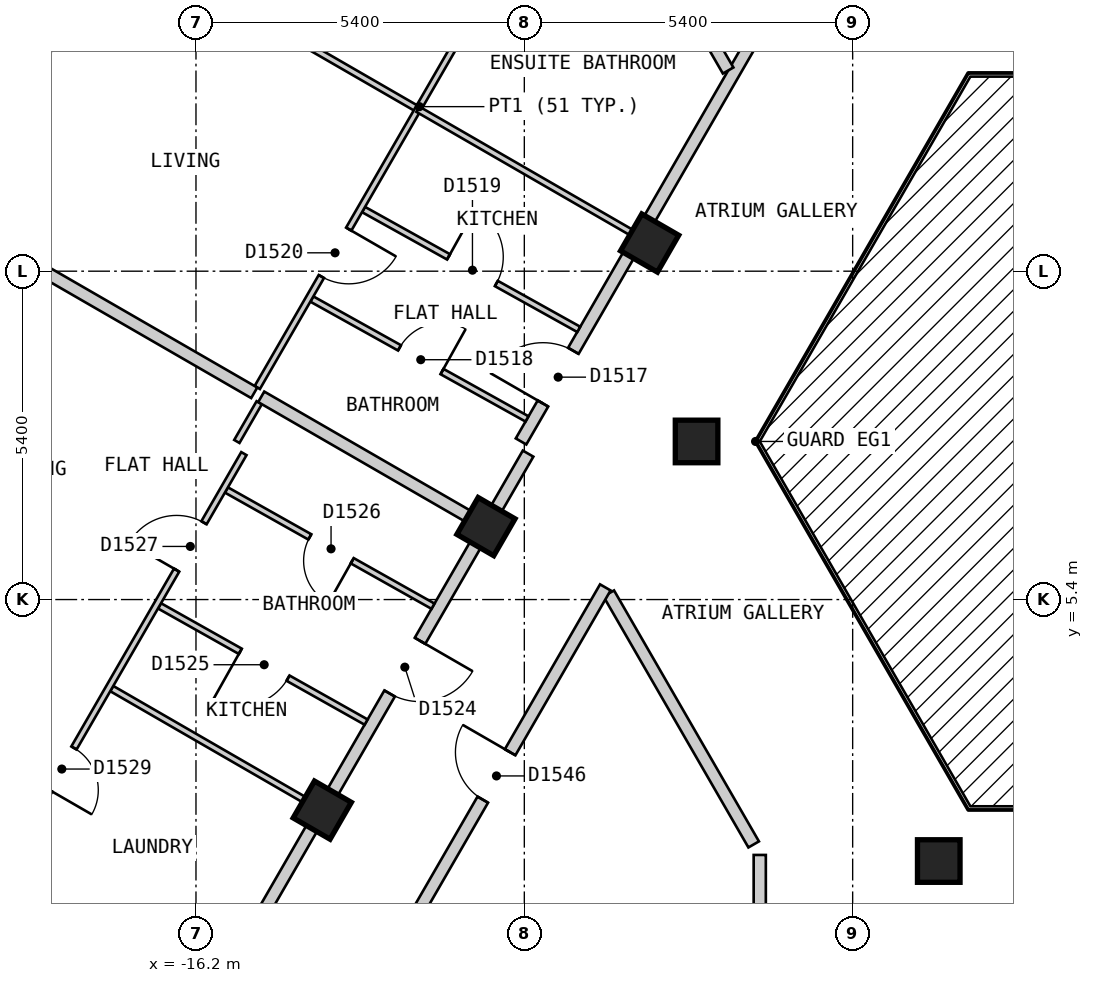
"""IFC4 building model, lengths in metres.
Left out: names, types, materials, properties, quantities, classifications, styles, units other than length and angle.
Written with IfcOpenShell. Run it as: python <this file> out.ifc"""

import sys

from ifc_helpers import new_model, si_unit, direction, frame, frame_2d, origin, origin_2d, place, context, subcontext, project, spatial, polyline, rectangle, outline, extrude, element, fill, save


model = new_model("IFC4")
c1 = context("Model", 3, precision=1e-05, world=origin(), true_north=direction((0.0, 1.0)))
c2 = subcontext(c1, "Body", "Model", "MODEL_VIEW")
j1 = project(units=[si_unit("LENGTHUNIT", "METRE"), si_unit("PLANEANGLEUNIT", "RADIAN")], contexts=[c1])
p1 = place(None, origin())
s1 = spatial("IfcSite", under=j1, at=p1, CompositionType="ELEMENT")
p2 = place(p1, origin())
s2 = spatial("IfcBuilding", under=s1, at=p2, CompositionType="ELEMENT")
p3 = place(p2, frame((0.0, 0.0, 196.2)))
s3 = spatial("IfcBuildingStorey", under=s2, at=p3, CompositionType="ELEMENT", Elevation=196.2)
for number, where, z_axis, x_axis in (
    (1, (-8.739, 11.263, 0.0), (0.0, 0.0, 1.0), (-0.5, -0.866, 0.0)),
    (2, (-7.967, 8.0, 0.0), (0.0, 0.0, 1.0), (1.0, 0.0, 0.0)),
    (3, (-11.431, 6.6, 0.0), (0.0, 0.0, 1.0), (-0.5, -0.866, 0.0)),
    (4, (-3.984, 1.1, 0.0), (0.0, 0.0, 1.0), (1.0, 0.0, 0.0)),
    (5, (-14.123, 1.937, 0.0), (0.0, 0.0, 1.0), (-0.5, -0.866, 0.0)),
):
    element("IfcColumn", number, at=place(p3, frame(where, z_axis=z_axis, x_axis=x_axis)), inside=s3, PredefinedType="COLUMN", context=c2, shape_type="SweptSolid", body=[
        extrude(rectangle(XDim=0.7, YDim=0.7, at=origin_2d()), origin(), (0.0, 0.0, 1.0), 3.0),
    ])
p4 = place(p3, frame((-14.592, 21.625, 0.0), z_axis=(0.0, 0.0, 1.0), x_axis=(-0.500010537973, -0.866019319597, 0.0)))
e6 = element("IfcWall", 6, at=p4, inside=s3, PredefinedType="SOLIDWALL", context=c2, shape_type="SweptSolid", body=[
    extrude(outline(polyline([(0.0, -0.15), (22.863, -0.15), (22.783, 0.15), (0.08, 0.15), (0.0, -0.15)])), origin(), (0.0, 0.0, 1.0), 2.6),
])
p5 = place(p4, frame((1.259, 0.0, 0.15)))
e7 = element("IfcOpeningElement", 7, at=p5, cuts=e6, PredefinedType="OPENING", context=c2, shape_type="SweptSolid", body=[
    extrude(rectangle(XDim=1.5, YDim=2.1, at=frame_2d((0.75, 1.05))), frame((0.0, 0.16, 0.0), z_axis=(0.0, -1.0, 0.0), x_axis=(1.0, 0.0, 0.0)), (0.0, 0.0, 1.0), 0.32),
])
p6 = place(p4, frame((3.952, 0.0, 0.15)))
e8 = element("IfcOpeningElement", 8, at=p6, cuts=e6, PredefinedType="OPENING", context=c2, shape_type="SweptSolid", body=[
    extrude(rectangle(XDim=1.5, YDim=2.1, at=frame_2d((0.75, 1.05))), frame((0.0, 0.16, 0.0), z_axis=(0.0, -1.0, 0.0), x_axis=(1.0, 0.0, 0.0)), (0.0, 0.0, 1.0), 0.32),
])
p7 = place(p4, frame((6.644, 0.0, 0.15)))
e9 = element("IfcOpeningElement", 9, at=p7, cuts=e6, PredefinedType="OPENING", context=c2, shape_type="SweptSolid", body=[
    extrude(rectangle(XDim=1.5, YDim=2.1, at=frame_2d((0.75, 1.05))), frame((0.0, 0.16, 0.0), z_axis=(0.0, -1.0, 0.0), x_axis=(1.0, 0.0, 0.0)), (0.0, 0.0, 1.0), 0.32),
])
p8 = place(p4, frame((9.335, 0.0, 0.15)))
e10 = element("IfcOpeningElement", 10, at=p8, cuts=e6, PredefinedType="OPENING", context=c2, shape_type="SweptSolid", body=[
    extrude(rectangle(XDim=1.5, YDim=2.1, at=frame_2d((0.75, 1.05))), frame((0.0, 0.16, 0.0), z_axis=(0.0, -1.0, 0.0), x_axis=(1.0, 0.0, 0.0)), (0.0, 0.0, 1.0), 0.32),
])
p9 = place(p4, frame((12.028, 0.0, 0.15)))
e11 = element("IfcOpeningElement", 11, at=p9, cuts=e6, PredefinedType="OPENING", context=c2, shape_type="SweptSolid", body=[
    extrude(rectangle(XDim=1.5, YDim=2.1, at=frame_2d((0.75, 1.05))), frame((0.0, 0.16, 0.0), z_axis=(0.0, -1.0, 0.0), x_axis=(1.0, 0.0, 0.0)), (0.0, 0.0, 1.0), 0.32),
])
p10 = place(p4, frame((14.72, 0.0, 0.15)))
e12 = element("IfcOpeningElement", 12, at=p10, cuts=e6, PredefinedType="OPENING", context=c2, shape_type="SweptSolid", body=[
    extrude(rectangle(XDim=1.5, YDim=2.1, at=frame_2d((0.75, 1.05))), frame((0.0, 0.16, 0.0), z_axis=(0.0, -1.0, 0.0), x_axis=(1.0, 0.0, 0.0)), (0.0, 0.0, 1.0), 0.32),
])
p11 = place(p4, frame((17.411, 0.0, 0.15)))
e13 = element("IfcOpeningElement", 13, at=p11, cuts=e6, PredefinedType="OPENING", context=c2, shape_type="SweptSolid", body=[
    extrude(rectangle(XDim=1.5, YDim=2.1, at=frame_2d((0.75, 1.05))), frame((0.0, 0.16, 0.0), z_axis=(0.0, -1.0, 0.0), x_axis=(1.0, 0.0, 0.0)), (0.0, 0.0, 1.0), 0.32),
])
p12 = place(p4, frame((20.104, 0.0, 0.15)))
e14 = element("IfcOpeningElement", 14, at=p12, cuts=e6, PredefinedType="OPENING", context=c2, shape_type="SweptSolid", body=[
    extrude(rectangle(XDim=1.5, YDim=2.1, at=frame_2d((0.75, 1.05))), frame((0.0, 0.16, 0.0), z_axis=(0.0, -1.0, 0.0), x_axis=(1.0, 0.0, 0.0)), (0.0, 0.0, 1.0), 0.32),
])
p13 = place(p3, frame((-9.411, 5.5, 0.0), z_axis=(0.0, 0.0, 1.0), x_axis=(0.500018099276, -0.86601495391, 0.0)))
e15 = element("IfcWall", 15, at=p13, inside=s3, PredefinedType="PARTITIONING", context=c2, shape_type="SweptSolid", body=[
    extrude(rectangle(XDim=4.765, YDim=0.2, at=frame_2d((2.383, 0.0))), origin(), (0.0, 0.0, 1.0), 2.6),
])
p14 = place(p3, frame((-13.048, -0.601, 0.0), z_axis=(0.0, 0.0, 1.0), x_axis=(0.499982180423, 0.866035691677, 0.0)))
e16 = element("IfcWall", 16, at=p14, inside=s3, PredefinedType="PARTITIONING", context=c2, shape_type="SweptSolid", body=[
    extrude(rectangle(XDim=7.16, YDim=0.2, at=frame_2d((3.58, 0.0))), origin(), (0.0, 0.0, 1.0), 2.6),
])
p15 = place(p14, frame((3.13, 0.0, 0.0)))
e17 = element("IfcOpeningElement", 17, at=p15, cuts=e16, PredefinedType="OPENING", context=c2, shape_type="SweptSolid", body=[
    extrude(rectangle(XDim=0.9, YDim=2.1, at=frame_2d((0.45, 1.05))), frame((0.0, 0.11, 0.0), z_axis=(0.0, -1.0, 0.0), x_axis=(1.0, 0.0, 0.0)), (0.0, 0.0, 1.0), 0.22),
])
p16 = place(p3, frame((-15.559, -0.551, 0.0), z_axis=(0.0, 0.0, 1.0), x_axis=(0.499964997208, 0.866045611713, 0.0)))
e18 = element("IfcWall", 18, at=p16, inside=s3, PredefinedType="PARTITIONING", context=c2, shape_type="SweptSolid", body=[
    extrude(rectangle(XDim=9.643, YDim=0.2, at=frame_2d((4.821, 0.0))), origin(), (0.0, 0.0, 1.0), 2.6),
])
p17 = place(p16, frame((5.088, 0.0, 0.0)))
e19 = element("IfcOpeningElement", 19, at=p17, cuts=e18, PredefinedType="OPENING", context=c2, shape_type="SweptSolid", body=[
    extrude(rectangle(XDim=1.0, YDim=2.1, at=frame_2d((0.5, 1.05))), frame((0.0, 0.11, 0.0), z_axis=(0.0, -1.0, 0.0), x_axis=(1.0, 0.0, 0.0)), (0.0, 0.0, 1.0), 0.22),
])
p18 = place(p3, frame((-10.854, 8.0, 0.0), z_axis=(0.0, 0.0, 1.0), x_axis=(0.499997637144, 0.866026767976, 0.0)))
e20 = element("IfcWall", 20, at=p18, inside=s3, PredefinedType="PARTITIONING", context=c2, shape_type="SweptSolid", body=[
    extrude(rectangle(XDim=10.854, YDim=0.2, at=frame_2d((5.427, 0.0))), origin(), (0.0, 0.0, 1.0), 2.6),
])
p19 = place(p18, frame((0.721, 0.0, 0.0)))
e21 = element("IfcOpeningElement", 21, at=p19, cuts=e20, PredefinedType="OPENING", context=c2, shape_type="SweptSolid", body=[
    extrude(rectangle(XDim=1.0, YDim=2.1, at=frame_2d((0.5, 1.05))), frame((0.0, 0.11, 0.0), z_axis=(0.0, -1.0, 0.0), x_axis=(1.0, 0.0, 0.0)), (0.0, 0.0, 1.0), 0.22),
])
p20 = place(p3, frame((-6.928, -2.8, 0.0), z_axis=(0.0, 0.0, 1.0), x_axis=(0.0, 1.0, 0.0)))
e22 = element("IfcWall", 22, at=p20, inside=s3, PredefinedType="PARTITIONING", context=c2, shape_type="SweptSolid", body=[
    extrude(rectangle(XDim=4.0, YDim=0.2, at=frame_2d((2.0, 0.0))), origin(), (0.0, 0.0, 1.0), 2.6),
])
p21 = place(p3, frame((-13.444, 11.814, 0.0), z_axis=(0.0, 0.0, 1.0), x_axis=(0.873653620945, -0.486548405207, 0.0)))
e23 = element("IfcWall", 23, at=p21, inside=s3, PredefinedType="PARTITIONING", context=c2, shape_type="SweptSolid", body=[
    extrude(rectangle(XDim=4.051, YDim=0.1, at=frame_2d((2.025, 0.0))), origin(), (0.0, 0.0, 1.0), 2.6),
])
p22 = place(p21, frame((1.6, 0.0, 0.0)))
e24 = element("IfcOpeningElement", 24, at=p22, cuts=e23, PredefinedType="OPENING", context=c2, shape_type="SweptSolid", body=[
    extrude(rectangle(XDim=0.9, YDim=2.1, at=frame_2d((0.45, 1.05))), frame((0.0, 0.06, 0.0), z_axis=(0.0, -1.0, 0.0), x_axis=(1.0, 0.0, 0.0)), (0.0, 0.0, 1.0), 0.12),
])
p23 = place(p3, frame((-14.294, 10.342, 0.0), z_axis=(0.0, 0.0, 1.0), x_axis=(0.873582256032, -0.486676527013, 0.0)))
e25 = element("IfcWall", 25, at=p23, inside=s3, PredefinedType="PARTITIONING", context=c2, shape_type="SweptSolid", body=[
    extrude(rectangle(XDim=4.05, YDim=0.1, at=frame_2d((2.025, 0.0))), origin(), (0.0, 0.0, 1.0), 2.6),
])
p24 = place(p23, frame((1.65, 0.0, 0.0)))
e26 = element("IfcOpeningElement", 26, at=p24, cuts=e25, PredefinedType="OPENING", context=c2, shape_type="SweptSolid", body=[
    extrude(rectangle(XDim=0.8, YDim=2.1, at=frame_2d((0.4, 1.05))), frame((0.0, 0.06, 0.0), z_axis=(0.0, -1.0, 0.0), x_axis=(1.0, 0.0, 0.0)), (0.0, 0.0, 1.0), 0.12),
])
p25 = place(p3, frame((-16.799, 5.296, 0.0), z_axis=(0.0, 0.0, 1.0), x_axis=(0.871565499758, -0.490279083413, 0.0)))
e27 = element("IfcWall", 27, at=p25, inside=s3, PredefinedType="PARTITIONING", context=c2, shape_type="SweptSolid", body=[
    extrude(rectangle(XDim=3.897, YDim=0.1, at=frame_2d((1.949, 0.0))), origin(), (0.0, 0.0, 1.0), 2.6),
])
p26 = place(p25, frame((1.524, 0.0, 0.0)))
e28 = element("IfcOpeningElement", 28, at=p26, cuts=e27, PredefinedType="OPENING", context=c2, shape_type="SweptSolid", body=[
    extrude(rectangle(XDim=0.9, YDim=2.1, at=frame_2d((0.45, 1.05))), frame((0.0, 0.06, 0.0), z_axis=(0.0, -1.0, 0.0), x_axis=(1.0, 0.0, 0.0)), (0.0, 0.0, 1.0), 0.12),
])
p27 = place(p3, frame((-15.699, 7.202, 0.0), z_axis=(0.0, 0.0, 1.0), x_axis=(0.871565499758, -0.490279083413, 0.0)))
e29 = element("IfcWall", 29, at=p27, inside=s3, PredefinedType="PARTITIONING", context=c2, shape_type="SweptSolid", body=[
    extrude(rectangle(XDim=3.897, YDim=0.1, at=frame_2d((1.949, 0.0))), origin(), (0.0, 0.0, 1.0), 2.6),
])
p28 = place(p27, frame((1.574, 0.0, 0.0)))
e30 = element("IfcOpeningElement", 30, at=p28, cuts=e29, PredefinedType="OPENING", context=c2, shape_type="SweptSolid", body=[
    extrude(rectangle(XDim=0.8, YDim=2.1, at=frame_2d((0.4, 1.05))), frame((0.0, 0.06, 0.0), z_axis=(0.0, -1.0, 0.0), x_axis=(1.0, 0.0, 0.0)), (0.0, 0.0, 1.0), 0.12),
])
p29 = place(p3, frame((-17.585, 3.936, 0.0), z_axis=(0.0, 0.0, 1.0), x_axis=(0.865979019114, -0.500080332001, 0.0)))
e31 = element("IfcWall", 31, at=p29, inside=s3, PredefinedType="PARTITIONING", context=c2, shape_type="SweptSolid", body=[
    extrude(rectangle(XDim=3.897, YDim=0.1, at=frame_2d((1.949, 0.0))), origin(), (0.0, 0.0, 1.0), 2.6),
])
p30 = place(p3, frame((-17.486, 16.313, 0.0), z_axis=(0.0, 0.0, 1.0), x_axis=(0.866004402611, -0.500036373335, 0.0)))
e32 = element("IfcWall", 32, at=p30, inside=s3, PredefinedType="PARTITIONING", context=c2, shape_type="SweptSolid", body=[
    extrude(rectangle(XDim=5.7, YDim=0.1, at=frame_2d((2.85, 0.0))), origin(), (0.0, 0.0, 1.0), 2.6),
])
p31 = place(p30, frame((2.4, 0.0, 0.0)))
e33 = element("IfcOpeningElement", 33, at=p31, cuts=e32, PredefinedType="OPENING", context=c2, shape_type="SweptSolid", body=[
    extrude(rectangle(XDim=0.9, YDim=2.1, at=frame_2d((0.45, 1.05))), frame((0.0, 0.06, 0.0), z_axis=(0.0, -1.0, 0.0), x_axis=(1.0, 0.0, 0.0)), (0.0, 0.0, 1.0), 0.12),
])
p32 = place(p3, frame((-19.195, 1.247, 0.0), z_axis=(0.0, 0.0, 1.0), x_axis=(0.499959862915, 0.866048575701, 0.0)))
e34 = element("IfcWall", 34, at=p32, inside=s3, PredefinedType="PARTITIONING", context=c2, shape_type="SweptSolid", body=[
    extrude(rectangle(XDim=7.566, YDim=0.1, at=frame_2d((3.783, 0.0))), origin(), (0.0, 0.0, 1.0), 2.6),
])
p33 = place(p32, frame((5.354, 0.0, 0.0)))
e35 = element("IfcOpeningElement", 35, at=p33, cuts=e34, PredefinedType="OPENING", context=c2, shape_type="SweptSolid", body=[
    extrude(rectangle(XDim=0.9, YDim=2.1, at=frame_2d((0.45, 1.05))), frame((0.0, 0.06, 0.0), z_axis=(0.0, -1.0, 0.0), x_axis=(1.0, 0.0, 0.0)), (0.0, 0.0, 1.0), 0.12),
])
p34 = place(p32, frame((1.177, 0.0, 0.0)))
e36 = element("IfcOpeningElement", 36, at=p34, cuts=e34, PredefinedType="OPENING", context=c2, shape_type="SweptSolid", body=[
    extrude(rectangle(XDim=0.8, YDim=2.1, at=frame_2d((0.4, 1.05))), frame((0.0, 0.06, 0.0), z_axis=(0.0, -1.0, 0.0), x_axis=(1.0, 0.0, 0.0)), (0.0, 0.0, 1.0), 0.12),
])
p35 = place(p3, frame((-15.528, 8.0, 0.0), z_axis=(0.0, 0.0, 1.0), x_axis=(0.500421336976, 0.865782008071, 0.0)))
e37 = element("IfcWall", 37, at=p35, inside=s3, PredefinedType="PARTITIONING", context=c2, shape_type="SweptSolid", body=[
    extrude(rectangle(XDim=0.736, YDim=0.1, at=frame_2d((0.368, 0.0))), origin(), (0.0, 0.0, 1.0), 2.6),
])
p36 = place(p3, frame((-15.192, 8.887, 0.0), z_axis=(0.0, 0.0, 1.0), x_axis=(0.500028204665, 0.866009119201, 0.0)))
e38 = element("IfcWall", 38, at=p36, inside=s3, PredefinedType="PARTITIONING", context=c2, shape_type="SweptSolid", body=[
    extrude(rectangle(XDim=10.667, YDim=0.1, at=frame_2d((5.334, 0.0))), origin(), (0.0, 0.0, 1.0), 2.6),
])
p37 = place(p36, frame((2.108, 0.0, 0.0)))
e39 = element("IfcOpeningElement", 39, at=p37, cuts=e38, PredefinedType="OPENING", context=c2, shape_type="SweptSolid", body=[
    extrude(rectangle(XDim=0.9, YDim=2.1, at=frame_2d((0.45, 1.05))), frame((0.0, 0.06, 0.0), z_axis=(0.0, -1.0, 0.0), x_axis=(1.0, 0.0, 0.0)), (0.0, 0.0, 1.0), 0.12),
])
p38 = place(p36, frame((7.576, 0.0, 0.0)))
e40 = element("IfcOpeningElement", 40, at=p38, cuts=e38, PredefinedType="OPENING", context=c2, shape_type="SweptSolid", body=[
    extrude(rectangle(XDim=0.8, YDim=2.1, at=frame_2d((0.4, 1.05))), frame((0.0, 0.06, 0.0), z_axis=(0.0, -1.0, 0.0), x_axis=(1.0, 0.0, 0.0)), (0.0, 0.0, 1.0), 0.12),
])
p39 = place(p3, frame((-9.628, 17.877, 0.0), z_axis=(0.0, 0.0, 1.0), x_axis=(0.499890461358, -0.866088636713, 0.0)))
e41 = element("IfcWall", 41, at=p39, inside=s3, PredefinedType="PARTITIONING", context=c2, shape_type="SweptSolid", body=[
    extrude(rectangle(XDim=4.361, YDim=0.2, at=frame_2d((2.18, 0.0))), origin(), (0.0, 0.0, 1.0), 2.6),
])
p40 = place(p3, frame((-20.178, 11.65, 0.0), z_axis=(0.0, 0.0, 1.0), x_axis=(0.866022950691, -0.500004248858, 0.0)))
e42 = element("IfcWall", 42, at=p40, inside=s3, PredefinedType="PARTITIONING", context=c2, shape_type="SweptSolid", body=[
    extrude(rectangle(XDim=5.7, YDim=0.2, at=frame_2d((2.85, 0.0))), origin(), (0.0, 0.0, 1.0), 2.6),
])
p41 = place(p3, frame((-15.127, 8.734, 0.0), z_axis=(0.0, 0.0, 1.0), x_axis=(0.865984601828, -0.500070664403, 0.0)))
e43 = element("IfcWall", 43, at=p41, inside=s3, PredefinedType="PARTITIONING", context=c2, shape_type="SweptSolid", body=[
    extrude(rectangle(XDim=4.167, YDim=0.2, at=frame_2d((2.084, 0.0))), origin(), (0.0, 0.0, 1.0), 2.6),
])
p42 = place(p3, frame((-12.55, 13.463, 0.0), z_axis=(0.0, 0.0, 1.0), x_axis=(0.86606561423, -0.499930346997, 0.0)))
e44 = element("IfcWall", 44, at=p42, inside=s3, PredefinedType="PARTITIONING", context=c2, shape_type="SweptSolid", body=[
    extrude(rectangle(XDim=4.1, YDim=0.1, at=frame_2d((2.05, 0.0))), origin(), (0.0, 0.0, 1.0), 2.6),
])
p43 = place(p19, origin())
e45 = element("IfcDoor", 45, at=p43, inside=s3, OperationType="SINGLE_SWING_LEFT", PredefinedType="DOOR", context=c2, shape_type="SweptSolid", body=[
    extrude(rectangle(XDim=1.0, YDim=2.1, at=frame_2d((0.5, 1.05))), frame((0.0, 0.025, 0.0), z_axis=(0.0, -1.0, 0.0), x_axis=(1.0, 0.0, 0.0)), (0.0, 0.0, 1.0), 0.05),
])
fill(e21, e45)
p44 = place(p24, origin())
e46 = element("IfcDoor", 46, at=p44, inside=s3, OperationType="SINGLE_SWING_RIGHT", PredefinedType="DOOR", context=c2, shape_type="SweptSolid", body=[
    extrude(rectangle(XDim=0.8, YDim=2.1, at=frame_2d((0.4, 1.05))), frame((0.0, 0.025, 0.0), z_axis=(0.0, -1.0, 0.0), x_axis=(1.0, 0.0, 0.0)), (0.0, 0.0, 1.0), 0.05),
])
fill(e26, e46)
p45 = place(p22, origin())
e47 = element("IfcDoor", 47, at=p45, inside=s3, OperationType="SINGLE_SWING_LEFT", PredefinedType="DOOR", context=c2, shape_type="SweptSolid", body=[
    extrude(rectangle(XDim=0.9, YDim=2.1, at=frame_2d((0.45, 1.05))), frame((0.0, 0.025, 0.0), z_axis=(0.0, -1.0, 0.0), x_axis=(1.0, 0.0, 0.0)), (0.0, 0.0, 1.0), 0.05),
])
fill(e24, e47)
p46 = place(p37, origin())
e48 = element("IfcDoor", 48, at=p46, inside=s3, OperationType="SINGLE_SWING_RIGHT", PredefinedType="DOOR", context=c2, shape_type="SweptSolid", body=[
    extrude(rectangle(XDim=0.9, YDim=2.1, at=frame_2d((0.45, 1.05))), frame((0.0, 0.025, 0.0), z_axis=(0.0, -1.0, 0.0), x_axis=(1.0, 0.0, 0.0)), (0.0, 0.0, 1.0), 0.05),
])
fill(e39, e48)
p47 = place(p17, origin())
e49 = element("IfcDoor", 49, at=p47, inside=s3, OperationType="SINGLE_SWING_RIGHT", PredefinedType="DOOR", context=c2, shape_type="SweptSolid", body=[
    extrude(rectangle(XDim=1.0, YDim=2.1, at=frame_2d((0.5, 1.05))), frame((0.0, 0.025, 0.0), z_axis=(0.0, -1.0, 0.0), x_axis=(1.0, 0.0, 0.0)), (0.0, 0.0, 1.0), 0.05),
])
fill(e19, e49)
p48 = place(p26, origin())
e50 = element("IfcDoor", 50, at=p48, inside=s3, OperationType="SINGLE_SWING_LEFT", PredefinedType="DOOR", context=c2, shape_type="SweptSolid", body=[
    extrude(rectangle(XDim=0.9, YDim=2.1, at=frame_2d((0.45, 1.05))), frame((0.0, 0.025, 0.0), z_axis=(0.0, -1.0, 0.0), x_axis=(1.0, 0.0, 0.0)), (0.0, 0.0, 1.0), 0.05),
])
fill(e28, e50)
p49 = place(p28, origin())
e51 = element("IfcDoor", 51, at=p49, inside=s3, OperationType="SINGLE_SWING_RIGHT", PredefinedType="DOOR", context=c2, shape_type="SweptSolid", body=[
    extrude(rectangle(XDim=0.8, YDim=2.1, at=frame_2d((0.4, 1.05))), frame((0.0, 0.025, 0.0), z_axis=(0.0, -1.0, 0.0), x_axis=(1.0, 0.0, 0.0)), (0.0, 0.0, 1.0), 0.05),
])
fill(e30, e51)
p50 = place(p33, origin())
e52 = element("IfcDoor", 52, at=p50, inside=s3, OperationType="SINGLE_SWING_LEFT", PredefinedType="DOOR", context=c2, shape_type="SweptSolid", body=[
    extrude(rectangle(XDim=0.9, YDim=2.1, at=frame_2d((0.45, 1.05))), frame((0.0, 0.025, 0.0), z_axis=(0.0, -1.0, 0.0), x_axis=(1.0, 0.0, 0.0)), (0.0, 0.0, 1.0), 0.05),
])
fill(e35, e52)
p51 = place(p34, origin())
e53 = element("IfcDoor", 53, at=p51, inside=s3, OperationType="SINGLE_SWING_LEFT", PredefinedType="DOOR", context=c2, shape_type="SweptSolid", body=[
    extrude(rectangle(XDim=0.8, YDim=2.1, at=frame_2d((0.4, 1.05))), frame((0.0, 0.025, 0.0), z_axis=(0.0, -1.0, 0.0), x_axis=(1.0, 0.0, 0.0)), (0.0, 0.0, 1.0), 0.05),
])
fill(e36, e53)
p52 = place(p15, origin())
e54 = element("IfcDoor", 54, at=p52, inside=s3, OperationType="SINGLE_SWING_RIGHT", PredefinedType="DOOR", context=c2, shape_type="SweptSolid", body=[
    extrude(rectangle(XDim=0.9, YDim=2.1, at=frame_2d((0.45, 1.05))), frame((0.0, 0.025, 0.0), z_axis=(0.0, -1.0, 0.0), x_axis=(1.0, 0.0, 0.0)), (0.0, 0.0, 1.0), 0.05),
])
fill(e17, e54)
save(model, sys.argv[1])
